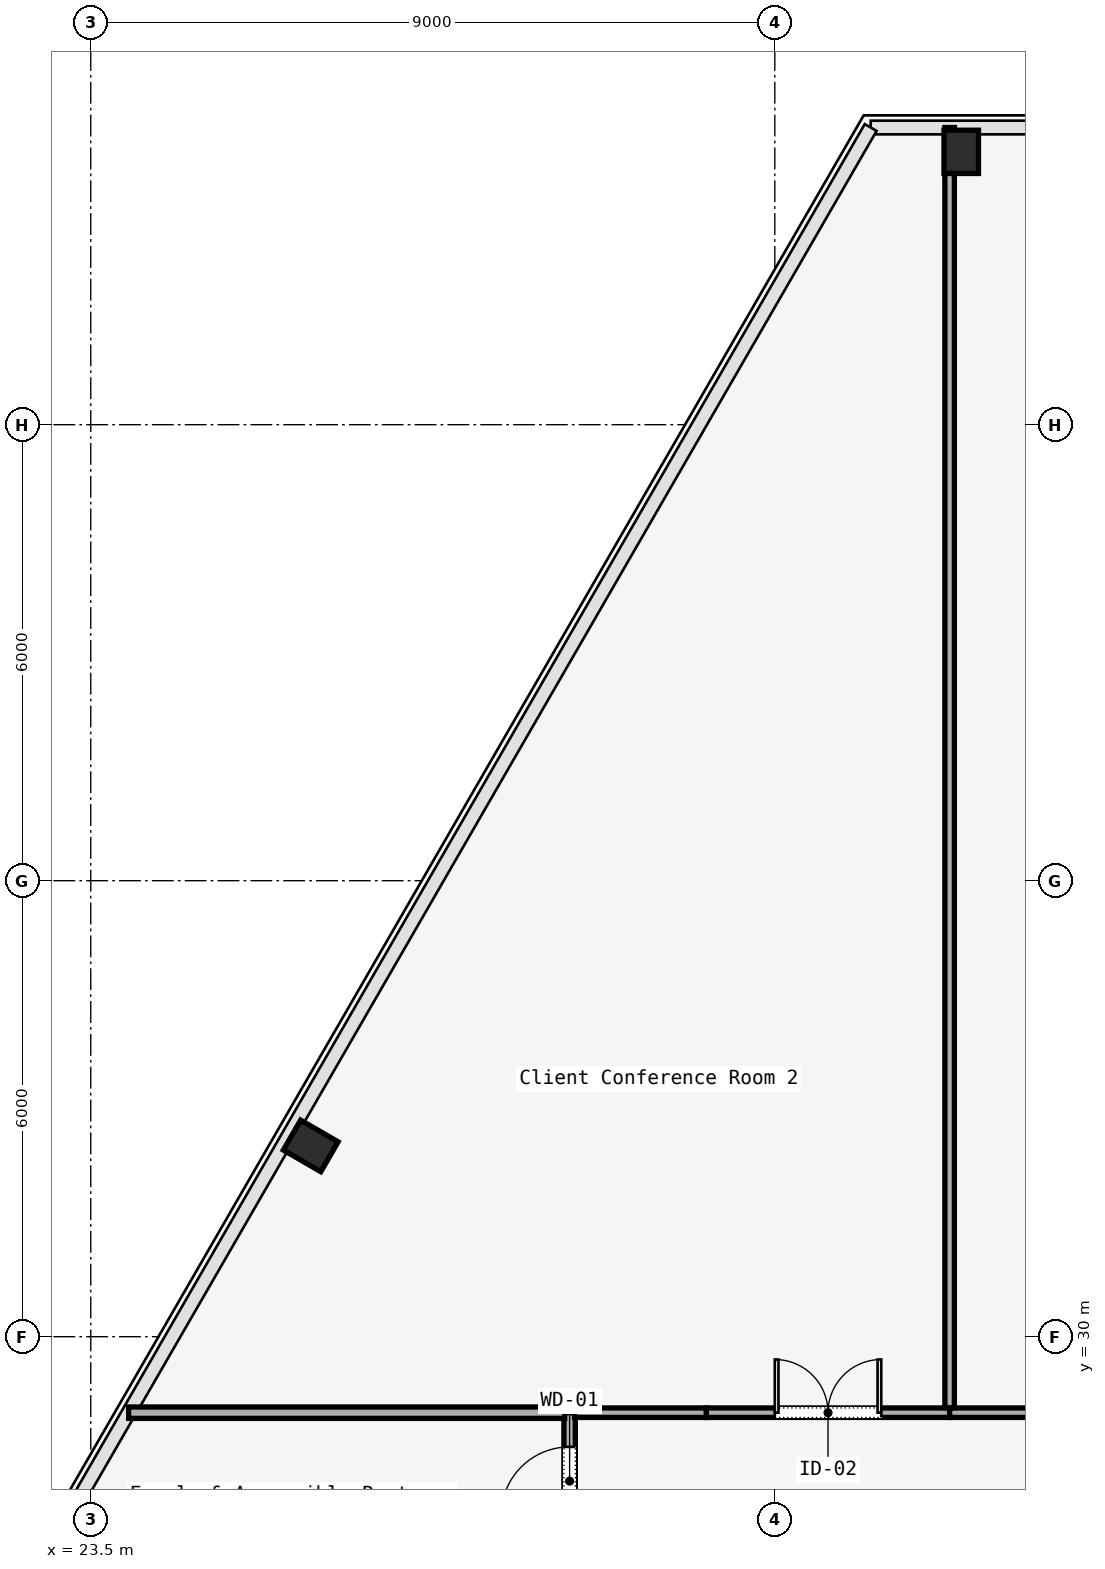
"""IFC4 building model, lengths in metres.
Left out: names, types, materials, properties, quantities, classifications, styles, units other than length and angle.
Written with IfcOpenShell. Run it as: python <this file> out.ifc"""

import sys

from ifc_helpers import new_model, si_unit, direction, frame, frame_2d, origin, origin_2d, place, context, subcontext, project, spatial, rectangle, i_section, extrude, element, fill, save


model = new_model("IFC4")
c1 = context("Model", 3, precision=1e-05, world=origin(), true_north=direction((0.0, 1.0)))
c2 = subcontext(c1, "Body", "Model", "MODEL_VIEW")
j1 = project(units=[si_unit("LENGTHUNIT", "METRE"), si_unit("PLANEANGLEUNIT", "RADIAN")], contexts=[c1])
p1 = place(None, origin())
s1 = spatial("IfcSite", under=j1, at=p1, CompositionType="ELEMENT")
p2 = place(p1, origin())
s2 = spatial("IfcBuilding", under=s1, at=p2, CompositionType="ELEMENT")
p3 = place(p2, frame((0.0, 0.0, 39.8)))
s3 = spatial("IfcBuildingStorey", under=s2, at=p3, CompositionType="ELEMENT", Elevation=39.8)
for number, where, z_axis, x_axis in (
    (1, (34.953, 45.59, 0.0), (0.0, 0.0, 1.0), (1.0, 0.0, 0.0)),
    (2, (26.394, 32.51, 0.0), (0.0, 0.0, 1.0), (0.5, 0.866, 0.0)),
):
    element("IfcColumn", number, at=place(p3, frame(where, z_axis=z_axis, x_axis=x_axis)), inside=s3, PredefinedType="COLUMN", context=c2, shape_type="SweptSolid", body=[
        extrude(i_section(OverallWidth=0.454, OverallDepth=0.569, WebThickness=0.078, FlangeThickness=0.08, FilletRadius=0.015, at=origin_2d()), origin(), (0.0, 0.0, 1.0), 3.58),
    ])
p4 = place(p3, frame((29.8, 27.2, 0.0), z_axis=(0.0, 0.0, 1.0), x_axis=(0.0, 1.0, 0.0)))
e3 = element("IfcWall", 3, at=p4, inside=s3, PredefinedType="PARTITIONING", context=c2, shape_type="SweptSolid", body=[
    extrude(rectangle(XDim=1.8, YDim=0.15, at=frame_2d((0.9, 0.0))), origin(), (0.0, 0.0, 1.0), 2.933),
])
p5 = place(p4, frame((0.45, 0.0, 0.0)))
e4 = element("IfcOpeningElement", 4, at=p5, cuts=e3, PredefinedType="OPENING", context=c2, shape_type="SweptSolid", body=[
    extrude(rectangle(XDim=0.9, YDim=2.15, at=frame_2d((0.45, 1.075))), frame((0.0, 0.075, 0.0), z_axis=(0.0, -1.0, 0.0), x_axis=(1.0, 0.0, 0.0)), (0.0, 0.0, 1.0), 0.15),
])
p6 = place(p3, frame((29.865, 29.0, 0.0), z_axis=(0.0, 0.0, 1.0), x_axis=(1.0, 0.0, 0.0)))
e5 = element("IfcWall", 5, at=p6, inside=s3, PredefinedType="PARTITIONING", context=c2, shape_type="SweptSolid", body=[
    extrude(rectangle(XDim=1.735, YDim=0.125, at=frame_2d((0.868, 0.0))), origin(), (0.0, 0.0, 1.0), 2.933),
])
p7 = place(p3, frame((31.6, 29.0, 0.0), z_axis=(0.0, 0.0, 1.0), x_axis=(1.0, 0.0, 0.0)))
e6 = element("IfcWall", 6, at=p7, inside=s3, PredefinedType="PARTITIONING", context=c2, shape_type="SweptSolid", body=[
    extrude(rectangle(XDim=3.2, YDim=0.125, at=frame_2d((1.6, 0.0))), origin(), (0.0, 0.0, 1.0), 2.933),
])
p8 = place(p7, frame((0.9, 0.0, 0.0)))
e7 = element("IfcOpeningElement", 7, at=p8, cuts=e6, PredefinedType="OPENING", context=c2, shape_type="SweptSolid", body=[
    extrude(rectangle(XDim=1.4, YDim=2.2, at=frame_2d((0.7, 1.1))), frame((0.0, 0.062, 0.0), z_axis=(0.0, -1.0, 0.0), x_axis=(1.0, 0.0, 0.0)), (0.0, 0.0, 1.0), 0.125),
])
p9 = place(p3, frame((34.8, 29.0, 0.0), z_axis=(0.0, 0.0, 1.0), x_axis=(1.0, 0.0, 0.0)))
e8 = element("IfcWall", 8, at=p9, inside=s3, PredefinedType="PARTITIONING", context=c2, shape_type="SweptSolid", body=[
    extrude(rectangle(XDim=5.226, YDim=0.125, at=frame_2d((2.613, 0.0))), origin(), (0.0, 0.0, 1.0), 2.933),
])
p10 = place(p9, frame((2.138, 0.0, 0.0)))
e9 = element("IfcOpeningElement", 9, at=p10, cuts=e8, PredefinedType="OPENING", context=c2, shape_type="SweptSolid", body=[
    extrude(rectangle(XDim=0.95, YDim=2.2, at=frame_2d((0.475, 1.1))), frame((0.0, 0.062, 0.0), z_axis=(0.0, -1.0, 0.0), x_axis=(1.0, 0.0, 0.0)), (0.0, 0.0, 1.0), 0.125),
])
p11 = place(p3, frame((23.998, 29.0, 0.0), z_axis=(0.0, 0.0, 1.0), x_axis=(1.0, 0.0, 0.0)))
e10 = element("IfcWall", 10, at=p11, inside=s3, PredefinedType="PARTITIONING", context=c2, shape_type="SweptSolid", body=[
    extrude(rectangle(XDim=5.737, YDim=0.15, at=frame_2d((2.868, 0.0))), origin(), (0.0, 0.0, 1.0), 2.933),
])
p12 = place(p3, frame((34.8, 45.91, 0.0), z_axis=(0.0, 0.0, 1.0), x_axis=(0.0, -1.0, 0.0)))
e11 = element("IfcWall", 11, at=p12, inside=s3, PredefinedType="PARTITIONING", context=c2, shape_type="SweptSolid", body=[
    extrude(rectangle(XDim=16.845, YDim=0.125, at=frame_2d((8.422, 0.0))), origin(), (0.0, 0.0, 1.0), 2.933),
])
p13 = place(p5, origin())
e12 = element("IfcDoor", 12, at=p13, inside=s3, OperationType="SINGLE_SWING_LEFT", PredefinedType="DOOR", context=c2, shape_type="SweptSolid", body=[
    extrude(rectangle(XDim=0.9, YDim=2.15, at=frame_2d((0.45, 1.075))), frame((0.0, 0.025, 0.0), z_axis=(0.0, -1.0, 0.0), x_axis=(1.0, 0.0, 0.0)), (0.0, 0.0, 1.0), 0.05),
])
fill(e4, e12)
p14 = place(p8, origin())
e13 = element("IfcDoor", 13, at=p14, inside=s3, OperationType="SINGLE_SWING_RIGHT", PredefinedType="DOOR", context=c2, shape_type="SweptSolid", body=[
    extrude(rectangle(XDim=1.4, YDim=2.2, at=frame_2d((0.7, 1.1))), frame((0.0, 0.025, 0.0), z_axis=(0.0, -1.0, 0.0), x_axis=(1.0, 0.0, 0.0)), (0.0, 0.0, 1.0), 0.05),
])
fill(e7, e13)
save(model, sys.argv[1])
